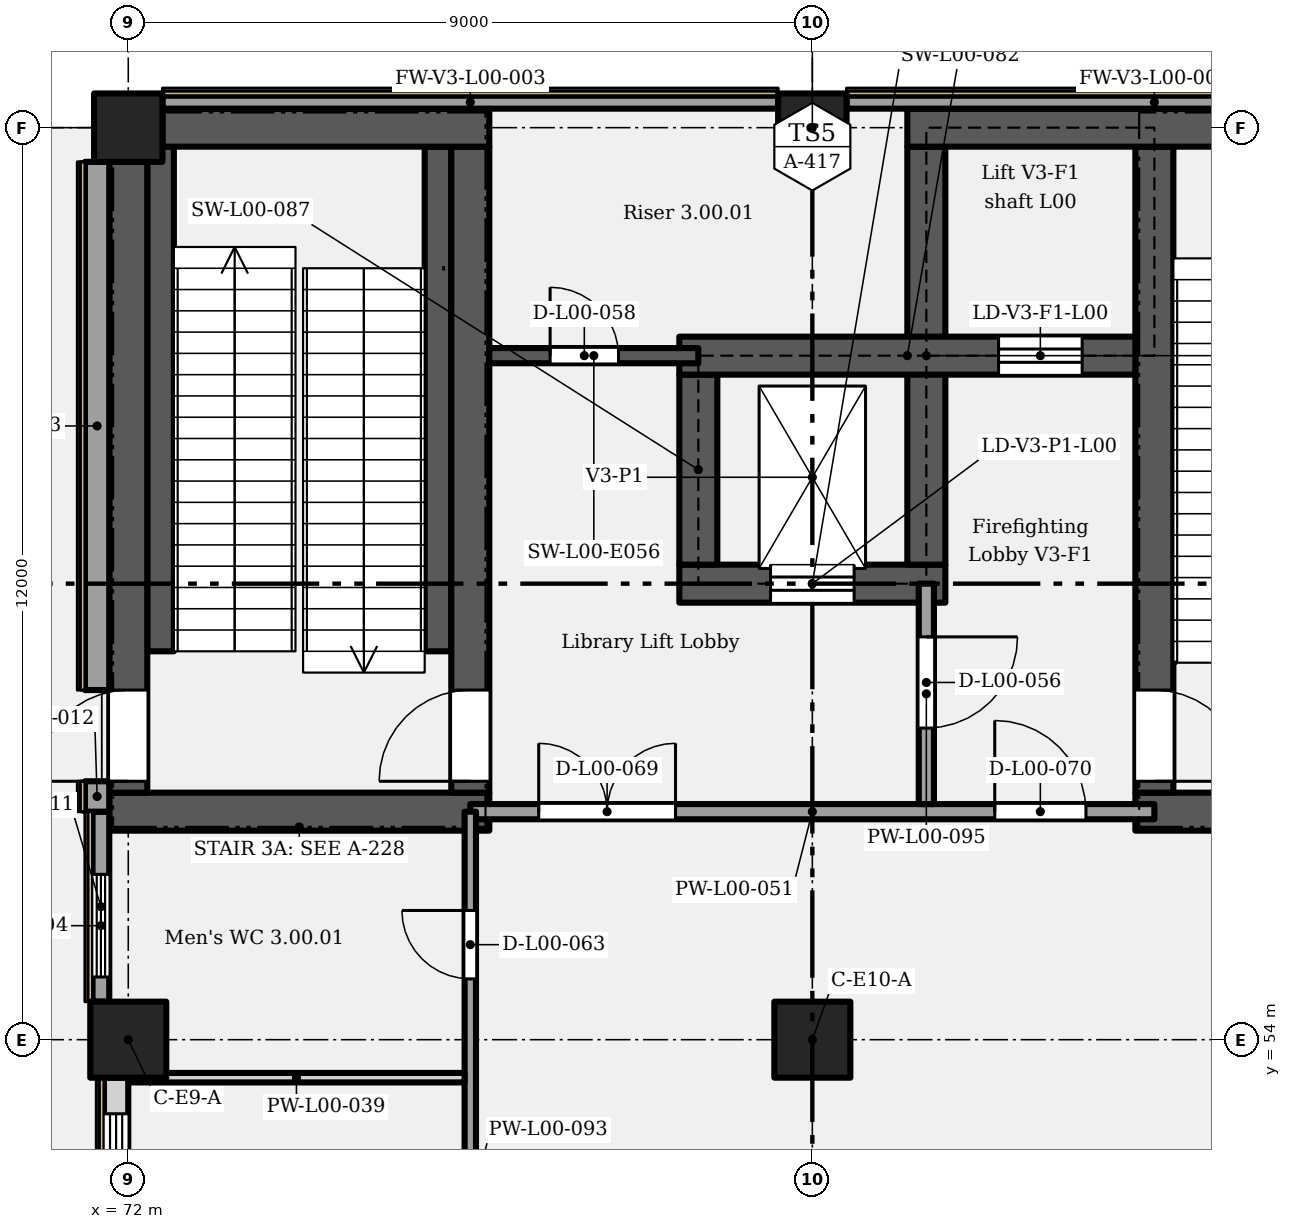
"""IFC4 building model, lengths in metres.
Left out: names, types, materials, properties, quantities, classifications, styles, units other than length and angle.
Written with IfcOpenShell. Run it as: python <this file> out.ifc"""

import sys

from ifc_helpers import new_model, si_unit, direction, frame, frame_2d, origin, origin_2d, place, context, subcontext, project, spatial, rectangle, extrude, element, fill, save


model = new_model("IFC4")
c1 = context("Model", 3, precision=1e-05, world=origin(), true_north=direction((0.0, 1.0)))
c2 = subcontext(c1, "Body", "Model", "MODEL_VIEW")
j1 = project(units=[si_unit("LENGTHUNIT", "METRE"), si_unit("PLANEANGLEUNIT", "RADIAN")], contexts=[c1])
p1 = place(None, origin())
s1 = spatial("IfcSite", under=j1, at=p1, CompositionType="ELEMENT")
p2 = place(p1, origin())
s2 = spatial("IfcBuilding", under=s1, at=p2, CompositionType="ELEMENT")
p3 = place(p2, origin())
s3 = spatial("IfcBuildingStorey", under=s2, at=p3, CompositionType="ELEMENT", Elevation=0.0)
for number, where, z_axis, x_axis in (
    (1, (72.0, 54.0, 0.0), (0.0, 0.0, 1.0), (1.0, 0.0, 0.0)),
    (2, (81.0, 54.0, 0.0), (0.0, 0.0, 1.0), (1.0, 0.0, 0.0)),
):
    element("IfcColumn", number, at=place(p3, frame(where, z_axis=z_axis, x_axis=x_axis)), inside=s3, PredefinedType="COLUMN", context=c2, shape_type="SweptSolid", body=[
        extrude(rectangle(XDim=1.0, YDim=1.0, at=origin_2d()), origin(), (0.0, 0.0, 1.0), 6.6),
    ])
for number, where, z_axis, x_axis in (
    (3, (72.0, 66.0, 0.0), (0.0, 0.0, 1.0), (1.0, 0.0, 0.0)),
    (4, (81.0, 66.0, 0.0), (0.0, 0.0, 1.0), (1.0, 0.0, 0.0)),
):
    element("IfcColumn", number, at=place(p3, frame(where, z_axis=z_axis, x_axis=x_axis)), inside=s3, PredefinedType="COLUMN", context=c2, shape_type="SweptSolid", body=[
        extrude(rectangle(XDim=0.9, YDim=0.9, at=origin_2d()), origin(), (0.0, 0.0, 1.0), 6.6),
    ])
p4 = place(p3, frame((71.75, 57.0, 0.0), z_axis=(0.0, 0.0, 1.0), x_axis=(1.0, 0.0, 0.0)))
e5 = element("IfcWall", 5, at=p4, inside=s3, PredefinedType="SHEAR", context=c2, shape_type="SweptSolid", body=[
    extrude(rectangle(XDim=5.0, YDim=0.5, at=frame_2d((2.5, 0.0))), origin(), (0.0, 0.0, 1.0), 6.3),
])
p5 = place(p3, frame((85.25, 57.0, 0.0), z_axis=(0.0, 0.0, 1.0), x_axis=(1.0, 0.0, 0.0)))
e6 = element("IfcWall", 6, at=p5, inside=s3, PredefinedType="SHEAR", context=c2, shape_type="SweptSolid", body=[
    extrude(rectangle(XDim=5.0, YDim=0.5, at=frame_2d((2.5, 0.0))), origin(), (0.0, 0.0, 1.0), 6.3),
])
p6 = place(p5, frame((1.9, 0.0, 0.0)))
e7 = element("IfcOpeningElement", 7, at=p6, cuts=e6, PredefinedType="OPENING", context=c2, shape_type="SweptSolid", body=[
    extrude(rectangle(XDim=1.2, YDim=2.1, at=frame_2d((0.6, 1.05))), frame((0.0, 0.26, 0.0), z_axis=(0.0, -1.0, 0.0), x_axis=(1.0, 0.0, 0.0)), (0.0, 0.0, 1.0), 0.52),
])
p7 = place(p3, frame((72.0, 57.25, 0.0), z_axis=(0.0, 0.0, 1.0), x_axis=(0.0, 1.0, 0.0)))
e8 = element("IfcWall", 8, at=p7, inside=s3, PredefinedType="SHEAR", context=c2, shape_type="SweptSolid", body=[
    extrude(rectangle(XDim=8.3, YDim=0.5, at=frame_2d((4.15, 0.0))), origin(), (0.0, 0.0, 1.0), 6.3),
])
p8 = place(p7, frame((0.15, 0.0, 0.0)))
e9 = element("IfcOpeningElement", 9, at=p8, cuts=e8, PredefinedType="OPENING", context=c2, shape_type="SweptSolid", body=[
    extrude(rectangle(XDim=1.2, YDim=2.1, at=frame_2d((0.6, 1.05))), frame((0.0, 0.26, 0.0), z_axis=(0.0, -1.0, 0.0), x_axis=(1.0, 0.0, 0.0)), (0.0, 0.0, 1.0), 0.52),
])
p9 = place(p3, frame((76.5, 57.25, 0.0), z_axis=(0.0, 0.0, 1.0), x_axis=(0.0, 1.0, 0.0)))
e10 = element("IfcWall", 10, at=p9, inside=s3, PredefinedType="SHEAR", context=c2, shape_type="SweptSolid", body=[
    extrude(rectangle(XDim=8.5, YDim=0.5, at=frame_2d((4.25, 0.0))), origin(), (0.0, 0.0, 1.0), 6.3),
])
p10 = place(p9, frame((0.15, 0.0, 0.0)))
e11 = element("IfcOpeningElement", 11, at=p10, cuts=e10, PredefinedType="OPENING", context=c2, shape_type="SweptSolid", body=[
    extrude(rectangle(XDim=1.2, YDim=2.1, at=frame_2d((0.6, 1.05))), frame((0.0, 0.26, 0.0), z_axis=(0.0, -1.0, 0.0), x_axis=(1.0, 0.0, 0.0)), (0.0, 0.0, 1.0), 0.52),
])
p11 = place(p3, frame((85.5, 57.25, 0.0), z_axis=(0.0, 0.0, 1.0), x_axis=(0.0, 1.0, 0.0)))
e12 = element("IfcWall", 12, at=p11, inside=s3, PredefinedType="SHEAR", context=c2, shape_type="SweptSolid", body=[
    extrude(rectangle(XDim=8.5, YDim=0.5, at=frame_2d((4.25, 0.0))), origin(), (0.0, 0.0, 1.0), 6.3),
])
p12 = place(p11, frame((1.35, 0.0, 0.0), z_axis=(0.0, 0.0, 1.0), x_axis=(-1.0, 0.0, 0.0)))
e13 = element("IfcOpeningElement", 13, at=p12, cuts=e12, PredefinedType="OPENING", context=c2, shape_type="SweptSolid", body=[
    extrude(rectangle(XDim=1.2, YDim=2.1, at=frame_2d((0.6, 1.05))), frame((0.0, 0.26, 0.0), z_axis=(0.0, -1.0, 0.0), x_axis=(1.0, 0.0, 0.0)), (0.0, 0.0, 1.0), 0.52),
])
p13 = place(p3, frame((79.25, 60.0, 0.0), z_axis=(0.0, 0.0, 1.0), x_axis=(1.0, 0.0, 0.0)))
e14 = element("IfcWall", 14, at=p13, inside=s3, PredefinedType="SHEAR", context=c2, shape_type="SweptSolid", body=[
    extrude(rectangle(XDim=3.5, YDim=0.5, at=frame_2d((1.75, 0.0))), origin(), (0.0, 0.0, 1.0), 6.3),
])
p14 = place(p13, frame((1.2, 0.0, 0.0)))
e15 = element("IfcOpeningElement", 15, at=p14, cuts=e14, PredefinedType="OPENING", context=c2, shape_type="SweptSolid", body=[
    extrude(rectangle(XDim=1.1, YDim=2.1, at=frame_2d((0.55, 1.05))), frame((0.0, 0.26, 0.0), z_axis=(0.0, -1.0, 0.0), x_axis=(1.0, 0.0, 0.0)), (0.0, 0.0, 1.0), 0.52),
])
p15 = place(p3, frame((79.5, 60.25, 0.0), z_axis=(0.0, 0.0, 1.0), x_axis=(0.0, 1.0, 0.0)))
e16 = element("IfcWall", 16, at=p15, inside=s3, PredefinedType="SHEAR", context=c2, shape_type="SweptSolid", body=[
    extrude(rectangle(XDim=2.5, YDim=0.5, at=frame_2d((1.25, 0.0))), origin(), (0.0, 0.0, 1.0), 6.3),
])
p16 = place(p3, frame((82.5, 60.25, 0.0), z_axis=(0.0, 0.0, 1.0), x_axis=(0.0, 1.0, 0.0)))
e17 = element("IfcWall", 17, at=p16, inside=s3, PredefinedType="SHEAR", context=c2, shape_type="SweptSolid", body=[
    extrude(rectangle(XDim=5.5, YDim=0.5, at=frame_2d((2.75, 0.0))), origin(), (0.0, 0.0, 1.0), 6.3),
])
p17 = place(p3, frame((79.25, 63.0, 0.0), z_axis=(0.0, 0.0, 1.0), x_axis=(1.0, 0.0, 0.0)))
e18 = element("IfcWall", 18, at=p17, inside=s3, PredefinedType="SHEAR", context=c2, shape_type="SweptSolid", body=[
    extrude(rectangle(XDim=6.0, YDim=0.5, at=frame_2d((3.0, 0.0))), origin(), (0.0, 0.0, 1.0), 6.3),
])
p18 = place(p17, frame((4.2, 0.0, 0.0)))
e19 = element("IfcOpeningElement", 19, at=p18, cuts=e18, PredefinedType="OPENING", context=c2, shape_type="SweptSolid", body=[
    extrude(rectangle(XDim=1.1, YDim=2.1, at=frame_2d((0.55, 1.05))), frame((0.0, 0.26, 0.0), z_axis=(0.0, -1.0, 0.0), x_axis=(1.0, 0.0, 0.0)), (0.0, 0.0, 1.0), 0.52),
])
p19 = place(p3, frame((72.45, 66.0, 0.0), z_axis=(0.0, 0.0, 1.0), x_axis=(1.0, 0.0, 0.0)))
e20 = element("IfcWall", 20, at=p19, inside=s3, PredefinedType="SHEAR", context=c2, shape_type="SweptSolid", body=[
    extrude(rectangle(XDim=4.3, YDim=0.5, at=frame_2d((2.15, 0.0))), origin(), (0.0, 0.0, 1.0), 6.3),
])
p20 = place(p3, frame((82.25, 66.0, 0.0), z_axis=(0.0, 0.0, 1.0), x_axis=(1.0, 0.0, 0.0)))
e21 = element("IfcWall", 21, at=p20, inside=s3, PredefinedType="SHEAR", context=c2, shape_type="SweptSolid", body=[
    extrude(rectangle(XDim=7.3, YDim=0.5, at=frame_2d((3.65, 0.0))), origin(), (0.0, 0.0, 1.0), 6.3),
])
for number, where, z_axis, x_axis in (
    (22, (72.45, 66.335, 0.0), (0.0, 0.0, 1.0), (1.0, 0.0, 0.0)),
    (23, (81.45, 66.335, 0.0), (0.0, 0.0, 1.0), (1.0, 0.0, 0.0)),
):
    element("IfcWall", number, at=place(p3, frame(where, z_axis=z_axis, x_axis=x_axis)), inside=s3, PredefinedType="SOLIDWALL", context=c2, shape_type="SweptSolid", body=[
        extrude(rectangle(XDim=8.1, YDim=0.17, at=frame_2d((4.05, 0.0))), origin(), (0.0, 0.0, 1.0), 6.3),
    ])
p21 = place(p3, frame((71.84, 46.5, 0.0), z_axis=(0.0, 0.0, 1.0), x_axis=(0.0, 1.0, 0.0)))
e24 = element("IfcWall", 24, at=p21, inside=s3, PredefinedType="SOLIDWALL", context=c2, shape_type="SweptSolid", body=[
    extrude(rectangle(XDim=7.0, YDim=0.32, at=frame_2d((3.5, 0.0))), origin(), (0.0, 0.0, 1.0), 6.3),
])
p22 = place(p21, frame((1.875, 0.0, 1.2)))
e25 = element("IfcOpeningElement", 25, at=p22, cuts=e24, PredefinedType="OPENING", context=c2, shape_type="SweptSolid", body=[
    extrude(rectangle(XDim=1.35, YDim=2.55, at=frame_2d((0.675, 1.275))), frame((0.0, 0.17, 0.0), z_axis=(0.0, -1.0, 0.0), x_axis=(1.0, 0.0, 0.0)), (0.0, 0.0, 1.0), 0.34),
])
p23 = place(p21, frame((5.175, 0.0, 1.2)))
e26 = element("IfcOpeningElement", 26, at=p23, cuts=e24, PredefinedType="OPENING", context=c2, shape_type="SweptSolid", body=[
    extrude(rectangle(XDim=1.35, YDim=2.55, at=frame_2d((0.675, 1.275))), frame((0.0, 0.17, 0.0), z_axis=(0.0, -1.0, 0.0), x_axis=(1.0, 0.0, 0.0)), (0.0, 0.0, 1.0), 0.34),
])
p24 = place(p3, frame((71.64, 54.5, 0.0), z_axis=(0.0, 0.0, 1.0), x_axis=(0.0, 1.0, 0.0)))
e27 = element("IfcWall", 27, at=p24, inside=s3, PredefinedType="SOLIDWALL", context=c2, shape_type="SweptSolid", body=[
    extrude(rectangle(XDim=2.5, YDim=0.22, at=frame_2d((1.25, 0.0))), origin(), (0.0, 0.0, 1.0), 6.3),
])
p25 = place(p24, frame((0.325, 0.0, 1.2)))
e28 = element("IfcOpeningElement", 28, at=p25, cuts=e27, PredefinedType="OPENING", context=c2, shape_type="SweptSolid", body=[
    extrude(rectangle(XDim=1.35, YDim=2.55, at=frame_2d((0.675, 1.275))), frame((0.0, 0.12, 0.0), z_axis=(0.0, -1.0, 0.0), x_axis=(1.0, 0.0, 0.0)), (0.0, 0.0, 1.0), 0.24),
])
p26 = place(p3, frame((71.59, 57.0, 0.0), z_axis=(0.0, 0.0, 1.0), x_axis=(0.0, 1.0, 0.0)))
e29 = element("IfcWall", 29, at=p26, inside=s3, PredefinedType="SOLIDWALL", context=c2, shape_type="SweptSolid", body=[
    extrude(rectangle(XDim=0.4, YDim=0.32, at=frame_2d((0.2, 0.0))), origin(), (0.0, 0.0, 1.0), 6.3),
])
p27 = place(p3, frame((71.59, 58.6, 0.0), z_axis=(0.0, 0.0, 1.0), x_axis=(0.0, 1.0, 0.0)))
e30 = element("IfcWall", 30, at=p27, inside=s3, PredefinedType="SOLIDWALL", context=c2, shape_type="SweptSolid", body=[
    extrude(rectangle(XDim=6.95, YDim=0.32, at=frame_2d((3.475, 0.0))), origin(), (0.0, 0.0, 1.0), 6.3),
])
p28 = place(p3, frame((72.0, 53.5, 0.0), z_axis=(0.0, 0.0, 1.0), x_axis=(1.0, 0.0, 0.0)))
e31 = element("IfcWall", 31, at=p28, inside=s3, PredefinedType="PARTITIONING", context=c2, shape_type="SweptSolid", body=[
    extrude(rectangle(XDim=4.425, YDim=0.125, at=frame_2d((2.212, 0.0))), origin(), (0.0, 0.0, 1.0), 6.3),
])
p29 = place(p3, frame((76.5, 57.0, 0.0), z_axis=(0.0, 0.0, 1.0), x_axis=(1.0, 0.0, 0.0)))
e32 = element("IfcWall", 32, at=p29, inside=s3, PredefinedType="PARTITIONING", context=c2, shape_type="SweptSolid", body=[
    extrude(rectangle(XDim=9.0, YDim=0.2, at=frame_2d((4.5, 0.0))), origin(), (0.0, 0.0, 1.0), 6.3),
])
p30 = place(p29, frame((0.9, 0.0, 0.0)))
e33 = element("IfcOpeningElement", 33, at=p30, cuts=e32, PredefinedType="OPENING", context=c2, shape_type="SweptSolid", body=[
    extrude(rectangle(XDim=1.8, YDim=2.1, at=frame_2d((0.9, 1.05))), frame((0.0, 0.11, 0.0), z_axis=(0.0, -1.0, 0.0), x_axis=(1.0, 0.0, 0.0)), (0.0, 0.0, 1.0), 0.22),
])
p31 = place(p29, frame((6.9, 0.0, 0.0)))
e34 = element("IfcOpeningElement", 34, at=p31, cuts=e32, PredefinedType="OPENING", context=c2, shape_type="SweptSolid", body=[
    extrude(rectangle(XDim=1.2, YDim=2.1, at=frame_2d((0.6, 1.05))), frame((0.0, 0.11, 0.0), z_axis=(0.0, -1.0, 0.0), x_axis=(1.0, 0.0, 0.0)), (0.0, 0.0, 1.0), 0.22),
])
p32 = place(p3, frame((76.75, 63.0, 0.0), z_axis=(0.0, 0.0, 1.0), x_axis=(1.0, 0.0, 0.0)))
e35 = element("IfcWall", 35, at=p32, inside=s3, PredefinedType="SHEAR", context=c2, shape_type="SweptSolid", body=[
    extrude(rectangle(XDim=2.75, YDim=0.2, at=frame_2d((1.375, 0.0))), origin(), (0.0, 0.0, 1.0), 6.3),
])
p33 = place(p32, frame((0.8, 0.0, 0.0)))
e36 = element("IfcOpeningElement", 36, at=p33, cuts=e35, PredefinedType="OPENING", context=c2, shape_type="SweptSolid", body=[
    extrude(rectangle(XDim=0.9, YDim=2.0, at=frame_2d((0.45, 1.0))), frame((0.0, 0.11, 0.0), z_axis=(0.0, -1.0, 0.0), x_axis=(1.0, 0.0, 0.0)), (0.0, 0.0, 1.0), 0.22),
])
p34 = place(p3, frame((76.5, 46.562, 0.0), z_axis=(0.0, 0.0, 1.0), x_axis=(0.0, 1.0, 0.0)))
e37 = element("IfcWall", 37, at=p34, inside=s3, PredefinedType="PARTITIONING", context=c2, shape_type="SweptSolid", body=[
    extrude(rectangle(XDim=10.438, YDim=0.15, at=frame_2d((5.219, 0.0))), origin(), (0.0, 0.0, 1.0), 6.3),
])
p35 = place(p34, frame((1.238, 0.0, 0.0)))
e38 = element("IfcOpeningElement", 38, at=p35, cuts=e37, PredefinedType="OPENING", context=c2, shape_type="SweptSolid", body=[
    extrude(rectangle(XDim=0.9, YDim=2.1, at=frame_2d((0.45, 1.05))), frame((0.0, 0.085, 0.0), z_axis=(0.0, -1.0, 0.0), x_axis=(1.0, 0.0, 0.0)), (0.0, 0.0, 1.0), 0.17),
])
p36 = place(p34, frame((4.688, 0.0, 0.0)))
e39 = element("IfcOpeningElement", 39, at=p36, cuts=e37, PredefinedType="OPENING", context=c2, shape_type="SweptSolid", body=[
    extrude(rectangle(XDim=1.0, YDim=2.1, at=frame_2d((0.5, 1.05))), frame((0.0, 0.085, 0.0), z_axis=(0.0, -1.0, 0.0), x_axis=(1.0, 0.0, 0.0)), (0.0, 0.0, 1.0), 0.17),
])
p37 = place(p34, frame((8.238, 0.0, 0.0)))
e40 = element("IfcOpeningElement", 40, at=p37, cuts=e37, PredefinedType="OPENING", context=c2, shape_type="SweptSolid", body=[
    extrude(rectangle(XDim=0.9, YDim=2.1, at=frame_2d((0.45, 1.05))), frame((0.0, 0.085, 0.0), z_axis=(0.0, -1.0, 0.0), x_axis=(1.0, 0.0, 0.0)), (0.0, 0.0, 1.0), 0.17),
])
p38 = place(p3, frame((82.5, 57.1, 0.0), z_axis=(0.0, 0.0, 1.0), x_axis=(0.0, 1.0, 0.0)))
e41 = element("IfcWall", 41, at=p38, inside=s3, PredefinedType="PARTITIONING", context=c2, shape_type="SweptSolid", body=[
    extrude(rectangle(XDim=2.9, YDim=0.2, at=frame_2d((1.45, 0.0))), origin(), (0.0, 0.0, 1.0), 6.3),
])
p39 = place(p38, frame((2.2, 0.0, 0.0), z_axis=(0.0, 0.0, 1.0), x_axis=(-1.0, 0.0, 0.0)))
e42 = element("IfcOpeningElement", 42, at=p39, cuts=e41, PredefinedType="OPENING", context=c2, shape_type="SweptSolid", body=[
    extrude(rectangle(XDim=1.2, YDim=2.1, at=frame_2d((0.6, 1.05))), frame((0.0, 0.11, 0.0), z_axis=(0.0, -1.0, 0.0), x_axis=(1.0, 0.0, 0.0)), (0.0, 0.0, 1.0), 0.22),
])
p40 = place(p3, frame((72.425, 59.11, 0.0), z_axis=(0.0, 0.0, 1.0), x_axis=(0.0, 1.0, 0.0)))
e43 = element("IfcWall", 43, at=p40, inside=s3, PredefinedType="SHEAR", context=c2, shape_type="SweptSolid", body=[
    extrude(rectangle(XDim=6.64, YDim=0.35, at=frame_2d((3.32, 0.0))), origin(), (0.0, 0.0, 1.0), 6.3),
])
p41 = place(p3, frame((76.075, 59.11, 0.0), z_axis=(0.0, 0.0, 1.0), x_axis=(0.0, 1.0, 0.0)))
e44 = element("IfcWall", 44, at=p41, inside=s3, PredefinedType="SHEAR", context=c2, shape_type="SweptSolid", body=[
    extrude(rectangle(XDim=6.64, YDim=0.35, at=frame_2d((3.32, 0.0))), origin(), (0.0, 0.0, 1.0), 3.1),
])
p42 = place(p23, origin())
e45 = element("IfcWindow", 45, at=p42, inside=s3, PartitioningType="SINGLE_PANEL", PredefinedType="WINDOW", context=c2, shape_type="SweptSolid", body=[
    extrude(rectangle(XDim=1.35, YDim=2.55, at=frame_2d((0.675, 1.275))), frame((0.0, 0.03, 0.0), z_axis=(0.0, -1.0, 0.0), x_axis=(1.0, 0.0, 0.0)), (0.0, 0.0, 1.0), 0.06),
])
fill(e26, e45)
p43 = place(p25, origin())
e46 = element("IfcWindow", 46, at=p43, inside=s3, PartitioningType="SINGLE_PANEL", PredefinedType="WINDOW", context=c2, shape_type="SweptSolid", body=[
    extrude(rectangle(XDim=1.35, YDim=2.55, at=frame_2d((0.675, 1.275))), frame((0.0, 0.03, 0.0), z_axis=(0.0, -1.0, 0.0), x_axis=(1.0, 0.0, 0.0)), (0.0, 0.0, 1.0), 0.06),
])
fill(e28, e46)
p44 = place(p8, origin())
e47 = element("IfcDoor", 47, at=p44, inside=s3, OperationType="SINGLE_SWING_RIGHT", PredefinedType="DOOR", context=c2, shape_type="SweptSolid", body=[
    extrude(rectangle(XDim=1.2, YDim=2.1, at=frame_2d((0.6, 1.05))), frame((0.0, 0.025, 0.0), z_axis=(0.0, -1.0, 0.0), x_axis=(1.0, 0.0, 0.0)), (0.0, 0.0, 1.0), 0.05),
])
fill(e9, e47)
p45 = place(p10, origin())
e48 = element("IfcDoor", 48, at=p45, inside=s3, OperationType="SINGLE_SWING_LEFT", PredefinedType="DOOR", context=c2, shape_type="SweptSolid", body=[
    extrude(rectangle(XDim=1.2, YDim=2.1, at=frame_2d((0.6, 1.05))), frame((0.0, 0.025, 0.0), z_axis=(0.0, -1.0, 0.0), x_axis=(1.0, 0.0, 0.0)), (0.0, 0.0, 1.0), 0.05),
])
fill(e11, e48)
p46 = place(p39, origin())
e49 = element("IfcDoor", 49, at=p46, inside=s3, OperationType="SINGLE_SWING_LEFT", PredefinedType="DOOR", context=c2, shape_type="SweptSolid", body=[
    extrude(rectangle(XDim=1.2, YDim=2.1, at=frame_2d((0.6, 1.05))), frame((0.0, 0.025, 0.0), z_axis=(0.0, -1.0, 0.0), x_axis=(1.0, 0.0, 0.0)), (0.0, 0.0, 1.0), 0.05),
])
fill(e42, e49)
p47 = place(p14, origin())
e50 = element("IfcDoor", 50, at=p47, inside=s3, OperationType="SLIDING_TO_LEFT", PredefinedType="DOOR", context=c2, shape_type="SweptSolid", body=[
    extrude(rectangle(XDim=1.1, YDim=2.1, at=frame_2d((0.55, 1.05))), frame((0.0, 0.025, 0.0), z_axis=(0.0, -1.0, 0.0), x_axis=(1.0, 0.0, 0.0)), (0.0, 0.0, 1.0), 0.05),
])
fill(e15, e50)
p48 = place(p33, origin())
e51 = element("IfcDoor", 51, at=p48, inside=s3, OperationType="SINGLE_SWING_LEFT", PredefinedType="DOOR", context=c2, shape_type="SweptSolid", body=[
    extrude(rectangle(XDim=0.9, YDim=2.0, at=frame_2d((0.45, 1.0))), frame((0.0, 0.025, 0.0), z_axis=(0.0, -1.0, 0.0), x_axis=(1.0, 0.0, 0.0)), (0.0, 0.0, 1.0), 0.05),
])
fill(e36, e51)
p49 = place(p18, origin())
e52 = element("IfcDoor", 52, at=p49, inside=s3, OperationType="SLIDING_TO_LEFT", PredefinedType="DOOR", context=c2, shape_type="SweptSolid", body=[
    extrude(rectangle(XDim=1.1, YDim=2.1, at=frame_2d((0.55, 1.05))), frame((0.0, 0.025, 0.0), z_axis=(0.0, -1.0, 0.0), x_axis=(1.0, 0.0, 0.0)), (0.0, 0.0, 1.0), 0.05),
])
fill(e19, e52)
p50 = place(p12, origin())
e53 = element("IfcDoor", 53, at=p50, inside=s3, OperationType="SINGLE_SWING_RIGHT", PredefinedType="DOOR", context=c2, shape_type="SweptSolid", body=[
    extrude(rectangle(XDim=1.2, YDim=2.1, at=frame_2d((0.6, 1.05))), frame((0.0, 0.025, 0.0), z_axis=(0.0, -1.0, 0.0), x_axis=(1.0, 0.0, 0.0)), (0.0, 0.0, 1.0), 0.05),
])
fill(e13, e53)
p51 = place(p37, origin())
e54 = element("IfcDoor", 54, at=p51, inside=s3, OperationType="SINGLE_SWING_RIGHT", PredefinedType="DOOR", context=c2, shape_type="SweptSolid", body=[
    extrude(rectangle(XDim=0.9, YDim=2.1, at=frame_2d((0.45, 1.05))), frame((0.0, 0.025, 0.0), z_axis=(0.0, -1.0, 0.0), x_axis=(1.0, 0.0, 0.0)), (0.0, 0.0, 1.0), 0.05),
])
fill(e40, e54)
p52 = place(p30, origin())
e55 = element("IfcDoor", 55, at=p52, inside=s3, OperationType="DOUBLE_DOOR_SINGLE_SWING", PredefinedType="DOOR", context=c2, shape_type="SweptSolid", body=[
    extrude(rectangle(XDim=1.8, YDim=2.1, at=frame_2d((0.9, 1.05))), frame((0.0, 0.025, 0.0), z_axis=(0.0, -1.0, 0.0), x_axis=(1.0, 0.0, 0.0)), (0.0, 0.0, 1.0), 0.05),
])
fill(e33, e55)
p53 = place(p31, origin())
e56 = element("IfcDoor", 56, at=p53, inside=s3, OperationType="SINGLE_SWING_LEFT", PredefinedType="DOOR", context=c2, shape_type="SweptSolid", body=[
    extrude(rectangle(XDim=1.2, YDim=2.1, at=frame_2d((0.6, 1.05))), frame((0.0, 0.025, 0.0), z_axis=(0.0, -1.0, 0.0), x_axis=(1.0, 0.0, 0.0)), (0.0, 0.0, 1.0), 0.05),
])
fill(e34, e56)
save(model, sys.argv[1])
